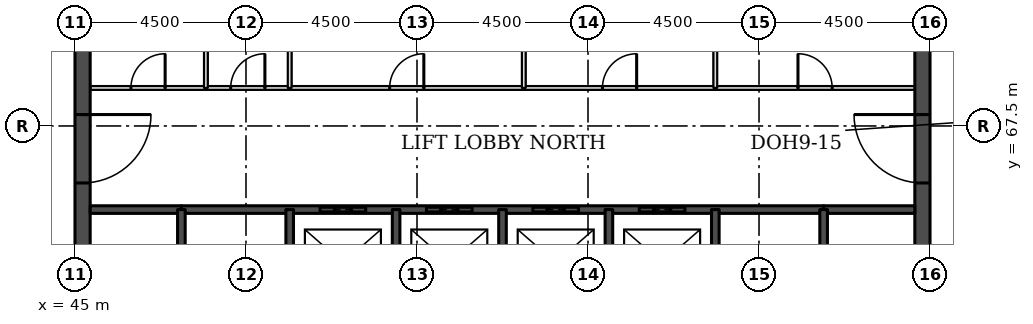
"""IFC4 building model, lengths in metres.
Left out: names, types, materials, properties, quantities, classifications, styles, units other than length and angle.
Written with IfcOpenShell. Run it as: python <this file> out.ifc"""

import sys

from ifc_helpers import new_model, si_unit, direction, frame, frame_2d, origin, place, context, subcontext, project, spatial, rectangle, extrude, element, fill, save


model = new_model("IFC4")
c1 = context("Model", 3, precision=1e-05, world=origin(), true_north=direction((0.0, 1.0)))
c2 = subcontext(c1, "Body", "Model", "MODEL_VIEW")
j1 = project(units=[si_unit("LENGTHUNIT", "METRE"), si_unit("PLANEANGLEUNIT", "RADIAN")], contexts=[c1])
p1 = place(None, origin())
s1 = spatial("IfcSite", under=j1, at=p1, CompositionType="ELEMENT")
p2 = place(p1, origin())
s2 = spatial("IfcBuilding", under=s1, at=p2, CompositionType="ELEMENT")
p3 = place(p2, frame((0.0, 0.0, 219.3)))
s3 = spatial("IfcBuildingStorey", under=s2, at=p3, CompositionType="ELEMENT", Elevation=219.3)
p4 = place(p3, frame((45.2, 49.5, 0.0), z_axis=(0.0, 0.0, 1.0), x_axis=(0.0, 1.0, 0.0)))
e1 = element("IfcWall", 1, at=p4, inside=s3, PredefinedType="SHEAR", context=c2, shape_type="SweptSolid", body=[
    extrude(rectangle(XDim=22.5, YDim=0.4, at=frame_2d((11.25, 0.0))), origin(), (0.0, 0.0, 1.0), 3.7),
])
p5 = place(p4, frame((4.2, 0.0, 0.0)))
e2 = element("IfcOpeningElement", 2, at=p5, cuts=e1, PredefinedType="OPENING", context=c2, shape_type="SweptSolid", body=[
    extrude(rectangle(XDim=1.8, YDim=2.1, at=frame_2d((0.9, 1.05))), frame((0.0, 0.21, 0.0), z_axis=(0.0, -1.0, 0.0), x_axis=(1.0, 0.0, 0.0)), (0.0, 0.0, 1.0), 0.42),
])
p6 = place(p4, frame((6.9, 0.0, 0.0)))
e3 = element("IfcOpeningElement", 3, at=p6, cuts=e1, PredefinedType="OPENING", context=c2, shape_type="SweptSolid", body=[
    extrude(rectangle(XDim=1.1, YDim=2.1, at=frame_2d((0.55, 1.05))), frame((0.0, 0.21, 0.0), z_axis=(0.0, -1.0, 0.0), x_axis=(1.0, 0.0, 0.0)), (0.0, 0.0, 1.0), 0.42),
])
p7 = place(p4, frame((13.6, 0.0, 0.0)))
e4 = element("IfcOpeningElement", 4, at=p7, cuts=e1, PredefinedType="OPENING", context=c2, shape_type="SweptSolid", body=[
    extrude(rectangle(XDim=1.1, YDim=2.1, at=frame_2d((0.55, 1.05))), frame((0.0, 0.21, 0.0), z_axis=(0.0, -1.0, 0.0), x_axis=(1.0, 0.0, 0.0)), (0.0, 0.0, 1.0), 0.42),
])
p8 = place(p4, frame((16.5, 0.0, 0.0)))
e5 = element("IfcOpeningElement", 5, at=p8, cuts=e1, PredefinedType="OPENING", context=c2, shape_type="SweptSolid", body=[
    extrude(rectangle(XDim=1.8, YDim=2.1, at=frame_2d((0.9, 1.05))), frame((0.0, 0.21, 0.0), z_axis=(0.0, -1.0, 0.0), x_axis=(1.0, 0.0, 0.0)), (0.0, 0.0, 1.0), 0.42),
])
p9 = place(p3, frame((67.3, 49.5, 0.0), z_axis=(0.0, 0.0, 1.0), x_axis=(0.0, 1.0, 0.0)))
e6 = element("IfcWall", 6, at=p9, inside=s3, PredefinedType="SHEAR", context=c2, shape_type="SweptSolid", body=[
    extrude(rectangle(XDim=22.5, YDim=0.4, at=frame_2d((11.25, 0.0))), origin(), (0.0, 0.0, 1.0), 3.7),
])
p10 = place(p9, frame((4.2, 0.0, 0.0)))
e7 = element("IfcOpeningElement", 7, at=p10, cuts=e6, PredefinedType="OPENING", context=c2, shape_type="SweptSolid", body=[
    extrude(rectangle(XDim=1.8, YDim=2.1, at=frame_2d((0.9, 1.05))), frame((0.0, 0.21, 0.0), z_axis=(0.0, -1.0, 0.0), x_axis=(1.0, 0.0, 0.0)), (0.0, 0.0, 1.0), 0.42),
])
p11 = place(p9, frame((6.9, 0.0, 0.0)))
e8 = element("IfcOpeningElement", 8, at=p11, cuts=e6, PredefinedType="OPENING", context=c2, shape_type="SweptSolid", body=[
    extrude(rectangle(XDim=1.1, YDim=2.1, at=frame_2d((0.55, 1.05))), frame((0.0, 0.21, 0.0), z_axis=(0.0, -1.0, 0.0), x_axis=(1.0, 0.0, 0.0)), (0.0, 0.0, 1.0), 0.42),
])
p12 = place(p9, frame((13.6, 0.0, 0.0)))
e9 = element("IfcOpeningElement", 9, at=p12, cuts=e6, PredefinedType="OPENING", context=c2, shape_type="SweptSolid", body=[
    extrude(rectangle(XDim=1.1, YDim=2.1, at=frame_2d((0.55, 1.05))), frame((0.0, 0.21, 0.0), z_axis=(0.0, -1.0, 0.0), x_axis=(1.0, 0.0, 0.0)), (0.0, 0.0, 1.0), 0.42),
])
p13 = place(p9, frame((16.5, 0.0, 0.0)))
e10 = element("IfcOpeningElement", 10, at=p13, cuts=e6, PredefinedType="OPENING", context=c2, shape_type="SweptSolid", body=[
    extrude(rectangle(XDim=1.8, YDim=2.1, at=frame_2d((0.9, 1.05))), frame((0.0, 0.21, 0.0), z_axis=(0.0, -1.0, 0.0), x_axis=(1.0, 0.0, 0.0)), (0.0, 0.0, 1.0), 0.42),
])
for number, where, z_axis, x_axis in (
    (11, (45.4, 65.3, 0.0), (0.0, 0.0, 1.0), (1.0, 0.0, 0.0)),
    (12, (64.7, 65.3, 0.0), (0.0, 0.0, 1.0), (1.0, 0.0, 0.0)),
):
    element("IfcWall", number, at=place(p3, frame(where, z_axis=z_axis, x_axis=x_axis)), inside=s3, PredefinedType="SOLIDWALL", context=c2, shape_type="SweptSolid", body=[
        extrude(rectangle(XDim=2.4, YDim=0.2, at=frame_2d((1.2, 0.0))), origin(), (0.0, 0.0, 1.0), 3.55),
    ])
p14 = place(p3, frame((47.8, 65.3, 0.0), z_axis=(0.0, 0.0, 1.0), x_axis=(1.0, 0.0, 0.0)))
e13 = element("IfcWall", 13, at=p14, inside=s3, PredefinedType="SOLIDWALL", context=c2, shape_type="SweptSolid", body=[
    extrude(rectangle(XDim=16.9, YDim=0.2, at=frame_2d((8.45, 0.0))), origin(), (0.0, 0.0, 1.0), 3.55),
])
p15 = place(p14, frame((3.65, 0.0, 0.0)))
e14 = element("IfcOpeningElement", 14, at=p15, cuts=e13, PredefinedType="OPENING", context=c2, shape_type="SweptSolid", body=[
    extrude(rectangle(XDim=1.2, YDim=2.1, at=frame_2d((0.6, 1.05))), frame((0.0, 0.11, 0.0), z_axis=(0.0, -1.0, 0.0), x_axis=(1.0, 0.0, 0.0)), (0.0, 0.0, 1.0), 0.22),
])
p16 = place(p14, frame((6.45, 0.0, 0.0)))
e15 = element("IfcOpeningElement", 15, at=p16, cuts=e13, PredefinedType="OPENING", context=c2, shape_type="SweptSolid", body=[
    extrude(rectangle(XDim=1.2, YDim=2.1, at=frame_2d((0.6, 1.05))), frame((0.0, 0.11, 0.0), z_axis=(0.0, -1.0, 0.0), x_axis=(1.0, 0.0, 0.0)), (0.0, 0.0, 1.0), 0.22),
])
p17 = place(p14, frame((9.25, 0.0, 0.0)))
e16 = element("IfcOpeningElement", 16, at=p17, cuts=e13, PredefinedType="OPENING", context=c2, shape_type="SweptSolid", body=[
    extrude(rectangle(XDim=1.2, YDim=2.1, at=frame_2d((0.6, 1.05))), frame((0.0, 0.11, 0.0), z_axis=(0.0, -1.0, 0.0), x_axis=(1.0, 0.0, 0.0)), (0.0, 0.0, 1.0), 0.22),
])
p18 = place(p14, frame((12.05, 0.0, 0.0)))
e17 = element("IfcOpeningElement", 17, at=p18, cuts=e13, PredefinedType="OPENING", context=c2, shape_type="SweptSolid", body=[
    extrude(rectangle(XDim=1.2, YDim=2.1, at=frame_2d((0.6, 1.05))), frame((0.0, 0.11, 0.0), z_axis=(0.0, -1.0, 0.0), x_axis=(1.0, 0.0, 0.0)), (0.0, 0.0, 1.0), 0.22),
])
p19 = place(p3, frame((45.4, 68.5, 0.0), z_axis=(0.0, 0.0, 1.0), x_axis=(1.0, 0.0, 0.0)))
e18 = element("IfcWall", 18, at=p19, inside=s3, PredefinedType="PARTITIONING", context=c2, shape_type="SweptSolid", body=[
    extrude(rectangle(XDim=21.7, YDim=0.1, at=frame_2d((10.85, 0.0))), origin(), (0.0, 0.0, 1.0), 3.55),
])
p20 = place(p19, frame((18.625, 0.0, 0.0)))
e19 = element("IfcOpeningElement", 19, at=p20, cuts=e18, PredefinedType="OPENING", context=c2, shape_type="SweptSolid", body=[
    extrude(rectangle(XDim=0.9, YDim=2.1, at=frame_2d((0.45, 1.05))), frame((0.0, 0.06, 0.0), z_axis=(0.0, -1.0, 0.0), x_axis=(1.0, 0.0, 0.0)), (0.0, 0.0, 1.0), 0.12),
])
p21 = place(p19, frame((1.073, 0.0, 0.0)))
e20 = element("IfcOpeningElement", 20, at=p21, cuts=e18, PredefinedType="OPENING", context=c2, shape_type="SweptSolid", body=[
    extrude(rectangle(XDim=0.9, YDim=2.1, at=frame_2d((0.45, 1.05))), frame((0.0, 0.06, 0.0), z_axis=(0.0, -1.0, 0.0), x_axis=(1.0, 0.0, 0.0)), (0.0, 0.0, 1.0), 0.12),
])
p22 = place(p19, frame((3.698, 0.0, 0.0)))
e21 = element("IfcOpeningElement", 21, at=p22, cuts=e18, PredefinedType="OPENING", context=c2, shape_type="SweptSolid", body=[
    extrude(rectangle(XDim=0.9, YDim=2.1, at=frame_2d((0.45, 1.05))), frame((0.0, 0.06, 0.0), z_axis=(0.0, -1.0, 0.0), x_axis=(1.0, 0.0, 0.0)), (0.0, 0.0, 1.0), 0.12),
])
p23 = place(p19, frame((13.48, 0.0, 0.0)))
e22 = element("IfcOpeningElement", 22, at=p23, cuts=e18, PredefinedType="OPENING", context=c2, shape_type="SweptSolid", body=[
    extrude(rectangle(XDim=0.9, YDim=2.1, at=frame_2d((0.45, 1.05))), frame((0.0, 0.06, 0.0), z_axis=(0.0, -1.0, 0.0), x_axis=(1.0, 0.0, 0.0)), (0.0, 0.0, 1.0), 0.12),
])
p24 = place(p19, frame((7.88, 0.0, 0.0)))
e23 = element("IfcOpeningElement", 23, at=p24, cuts=e18, PredefinedType="OPENING", context=c2, shape_type="SweptSolid", body=[
    extrude(rectangle(XDim=0.9, YDim=2.1, at=frame_2d((0.45, 1.05))), frame((0.0, 0.06, 0.0), z_axis=(0.0, -1.0, 0.0), x_axis=(1.0, 0.0, 0.0)), (0.0, 0.0, 1.0), 0.12),
])
p25 = place(p3, frame((47.8, 62.0, 0.0), z_axis=(0.0, 0.0, 1.0), x_axis=(0.0, 1.0, 0.0)))
e24 = element("IfcWall", 24, at=p25, inside=s3, PredefinedType="SOLIDWALL", context=c2, shape_type="SweptSolid", body=[
    extrude(rectangle(XDim=3.3, YDim=0.2, at=frame_2d((1.65, 0.0))), origin(), (0.0, 0.0, 1.0), 3.55),
])
p26 = place(p25, frame((1.1, 0.0, 0.0)))
e25 = element("IfcOpeningElement", 25, at=p26, cuts=e24, PredefinedType="OPENING", context=c2, shape_type="SweptSolid", body=[
    extrude(rectangle(XDim=1.1, YDim=2.1, at=frame_2d((0.55, 1.05))), frame((0.0, 0.11, 0.0), z_axis=(0.0, -1.0, 0.0), x_axis=(1.0, 0.0, 0.0)), (0.0, 0.0, 1.0), 0.22),
])
for number, where, z_axis, x_axis in (
    (26, (48.445, 68.5, 0.0), (0.0, 0.0, 1.0), (0.0, 1.0, 0.0)),
    (27, (50.65, 68.5, 0.0), (0.0, 0.0, 1.0), (0.0, 1.0, 0.0)),
):
    element("IfcWall", number, at=place(p3, frame(where, z_axis=z_axis, x_axis=x_axis)), inside=s3, PredefinedType="PARTITIONING", context=c2, shape_type="SweptSolid", body=[
        extrude(rectangle(XDim=3.1, YDim=0.1, at=frame_2d((1.55, 0.0))), origin(), (0.0, 0.0, 1.0), 3.55),
    ])
p27 = place(p3, frame((50.65, 62.0, 0.0), z_axis=(0.0, 0.0, 1.0), x_axis=(0.0, 1.0, 0.0)))
e28 = element("IfcWall", 28, at=p27, inside=s3, PredefinedType="SOLIDWALL", context=c2, shape_type="SweptSolid", body=[
    extrude(rectangle(XDim=3.3, YDim=0.2, at=frame_2d((1.65, 0.0))), origin(), (0.0, 0.0, 1.0), 3.55),
])
for number, where, z_axis, x_axis in (
    (29, (53.45, 62.5, 0.0), (0.0, 0.0, 1.0), (0.0, 1.0, 0.0)),
    (30, (56.25, 62.5, 0.0), (0.0, 0.0, 1.0), (0.0, 1.0, 0.0)),
):
    element("IfcWall", number, at=place(p3, frame(where, z_axis=z_axis, x_axis=x_axis)), inside=s3, PredefinedType="SOLIDWALL", context=c2, shape_type="SweptSolid", body=[
        extrude(rectangle(XDim=2.8, YDim=0.2, at=frame_2d((1.4, 0.0))), origin(), (0.0, 0.0, 1.0), 3.55),
    ])
p28 = place(p3, frame((56.81, 68.5, 0.0), z_axis=(0.0, 0.0, 1.0), x_axis=(0.0, 1.0, 0.0)))
e31 = element("IfcWall", 31, at=p28, inside=s3, PredefinedType="PARTITIONING", context=c2, shape_type="SweptSolid", body=[
    extrude(rectangle(XDim=3.1, YDim=0.1, at=frame_2d((1.55, 0.0))), origin(), (0.0, 0.0, 1.0), 3.55),
])
p29 = place(p3, frame((59.05, 62.5, 0.0), z_axis=(0.0, 0.0, 1.0), x_axis=(0.0, 1.0, 0.0)))
e32 = element("IfcWall", 32, at=p29, inside=s3, PredefinedType="SOLIDWALL", context=c2, shape_type="SweptSolid", body=[
    extrude(rectangle(XDim=2.8, YDim=0.2, at=frame_2d((1.4, 0.0))), origin(), (0.0, 0.0, 1.0), 3.55),
])
p30 = place(p3, frame((61.85, 68.5, 0.0), z_axis=(0.0, 0.0, 1.0), x_axis=(0.0, 1.0, 0.0)))
e33 = element("IfcWall", 33, at=p30, inside=s3, PredefinedType="PARTITIONING", context=c2, shape_type="SweptSolid", body=[
    extrude(rectangle(XDim=3.1, YDim=0.1, at=frame_2d((1.55, 0.0))), origin(), (0.0, 0.0, 1.0), 3.55),
])
p31 = place(p3, frame((61.85, 62.0, 0.0), z_axis=(0.0, 0.0, 1.0), x_axis=(0.0, 1.0, 0.0)))
e34 = element("IfcWall", 34, at=p31, inside=s3, PredefinedType="SOLIDWALL", context=c2, shape_type="SweptSolid", body=[
    extrude(rectangle(XDim=3.3, YDim=0.2, at=frame_2d((1.65, 0.0))), origin(), (0.0, 0.0, 1.0), 3.55),
])
p32 = place(p3, frame((64.7, 62.0, 0.0), z_axis=(0.0, 0.0, 1.0), x_axis=(0.0, 1.0, 0.0)))
e35 = element("IfcWall", 35, at=p32, inside=s3, PredefinedType="SOLIDWALL", context=c2, shape_type="SweptSolid", body=[
    extrude(rectangle(XDim=3.3, YDim=0.2, at=frame_2d((1.65, 0.0))), origin(), (0.0, 0.0, 1.0), 3.55),
])
p33 = place(p32, frame((1.1, 0.0, 0.0)))
e36 = element("IfcOpeningElement", 36, at=p33, cuts=e35, PredefinedType="OPENING", context=c2, shape_type="SweptSolid", body=[
    extrude(rectangle(XDim=1.1, YDim=2.1, at=frame_2d((0.55, 1.05))), frame((0.0, 0.11, 0.0), z_axis=(0.0, -1.0, 0.0), x_axis=(1.0, 0.0, 0.0)), (0.0, 0.0, 1.0), 0.22),
])
p34 = place(p15, origin())
e37 = element("IfcDoor", 37, at=p34, inside=s3, OperationType="DOUBLE_DOOR_SLIDING", PredefinedType="DOOR", context=c2, shape_type="SweptSolid", body=[
    extrude(rectangle(XDim=1.2, YDim=2.1, at=frame_2d((0.6, 1.05))), frame((0.0, 0.025, 0.0), z_axis=(0.0, -1.0, 0.0), x_axis=(1.0, 0.0, 0.0)), (0.0, 0.0, 1.0), 0.05),
])
fill(e14, e37)
p35 = place(p16, origin())
e38 = element("IfcDoor", 38, at=p35, inside=s3, OperationType="DOUBLE_DOOR_SLIDING", PredefinedType="DOOR", context=c2, shape_type="SweptSolid", body=[
    extrude(rectangle(XDim=1.2, YDim=2.1, at=frame_2d((0.6, 1.05))), frame((0.0, 0.025, 0.0), z_axis=(0.0, -1.0, 0.0), x_axis=(1.0, 0.0, 0.0)), (0.0, 0.0, 1.0), 0.05),
])
fill(e15, e38)
p36 = place(p17, origin())
e39 = element("IfcDoor", 39, at=p36, inside=s3, OperationType="DOUBLE_DOOR_SLIDING", PredefinedType="DOOR", context=c2, shape_type="SweptSolid", body=[
    extrude(rectangle(XDim=1.2, YDim=2.1, at=frame_2d((0.6, 1.05))), frame((0.0, 0.025, 0.0), z_axis=(0.0, -1.0, 0.0), x_axis=(1.0, 0.0, 0.0)), (0.0, 0.0, 1.0), 0.05),
])
fill(e16, e39)
p37 = place(p18, origin())
e40 = element("IfcDoor", 40, at=p37, inside=s3, OperationType="DOUBLE_DOOR_SLIDING", PredefinedType="DOOR", context=c2, shape_type="SweptSolid", body=[
    extrude(rectangle(XDim=1.2, YDim=2.1, at=frame_2d((0.6, 1.05))), frame((0.0, 0.025, 0.0), z_axis=(0.0, -1.0, 0.0), x_axis=(1.0, 0.0, 0.0)), (0.0, 0.0, 1.0), 0.05),
])
fill(e17, e40)
p38 = place(p8, frame((1.8, 0.0, 0.0), z_axis=(0.0, 0.0, 1.0), x_axis=(-1.0, 0.0, 0.0)))
e41 = element("IfcDoor", 41, at=p38, inside=s3, OperationType="SINGLE_SWING_LEFT", PredefinedType="DOOR", context=c2, shape_type="SweptSolid", body=[
    extrude(rectangle(XDim=1.8, YDim=2.1, at=frame_2d((0.9, 1.05))), frame((0.0, 0.025, 0.0), z_axis=(0.0, -1.0, 0.0), x_axis=(1.0, 0.0, 0.0)), (0.0, 0.0, 1.0), 0.05),
])
fill(e5, e41)
p39 = place(p13, origin())
e42 = element("IfcDoor", 42, at=p39, inside=s3, OperationType="SINGLE_SWING_RIGHT", PredefinedType="DOOR", context=c2, shape_type="SweptSolid", body=[
    extrude(rectangle(XDim=1.8, YDim=2.1, at=frame_2d((0.9, 1.05))), frame((0.0, 0.025, 0.0), z_axis=(0.0, -1.0, 0.0), x_axis=(1.0, 0.0, 0.0)), (0.0, 0.0, 1.0), 0.05),
])
fill(e10, e42)
p40 = place(p20, origin())
e43 = element("IfcDoor", 43, at=p40, inside=s3, OperationType="SINGLE_SWING_LEFT", PredefinedType="DOOR", context=c2, shape_type="SweptSolid", body=[
    extrude(rectangle(XDim=0.9, YDim=2.1, at=frame_2d((0.45, 1.05))), frame((0.0, 0.025, 0.0), z_axis=(0.0, -1.0, 0.0), x_axis=(1.0, 0.0, 0.0)), (0.0, 0.0, 1.0), 0.05),
])
fill(e19, e43)
p41 = place(p21, origin())
e44 = element("IfcDoor", 44, at=p41, inside=s3, OperationType="SINGLE_SWING_RIGHT", PredefinedType="DOOR", context=c2, shape_type="SweptSolid", body=[
    extrude(rectangle(XDim=0.9, YDim=2.1, at=frame_2d((0.45, 1.05))), frame((0.0, 0.025, 0.0), z_axis=(0.0, -1.0, 0.0), x_axis=(1.0, 0.0, 0.0)), (0.0, 0.0, 1.0), 0.05),
])
fill(e20, e44)
p42 = place(p22, origin())
e45 = element("IfcDoor", 45, at=p42, inside=s3, OperationType="SINGLE_SWING_RIGHT", PredefinedType="DOOR", context=c2, shape_type="SweptSolid", body=[
    extrude(rectangle(XDim=0.9, YDim=2.1, at=frame_2d((0.45, 1.05))), frame((0.0, 0.025, 0.0), z_axis=(0.0, -1.0, 0.0), x_axis=(1.0, 0.0, 0.0)), (0.0, 0.0, 1.0), 0.05),
])
fill(e21, e45)
p43 = place(p23, origin())
e46 = element("IfcDoor", 46, at=p43, inside=s3, OperationType="SINGLE_SWING_RIGHT", PredefinedType="DOOR", context=c2, shape_type="SweptSolid", body=[
    extrude(rectangle(XDim=0.9, YDim=2.1, at=frame_2d((0.45, 1.05))), frame((0.0, 0.025, 0.0), z_axis=(0.0, -1.0, 0.0), x_axis=(1.0, 0.0, 0.0)), (0.0, 0.0, 1.0), 0.05),
])
fill(e22, e46)
p44 = place(p24, origin())
e47 = element("IfcDoor", 47, at=p44, inside=s3, OperationType="SINGLE_SWING_RIGHT", PredefinedType="DOOR", context=c2, shape_type="SweptSolid", body=[
    extrude(rectangle(XDim=0.9, YDim=2.1, at=frame_2d((0.45, 1.05))), frame((0.0, 0.025, 0.0), z_axis=(0.0, -1.0, 0.0), x_axis=(1.0, 0.0, 0.0)), (0.0, 0.0, 1.0), 0.05),
])
fill(e23, e47)
save(model, sys.argv[1])
